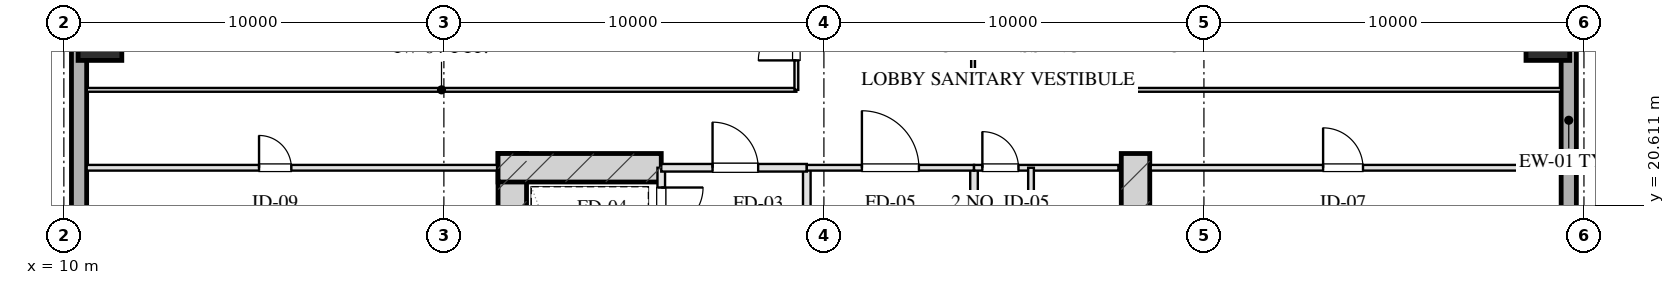
"""IFC4 building model, lengths in metres.
Left out: names, types, materials, properties, quantities, classifications, styles, units other than length and angle.
Written with IfcOpenShell. Run it as: python <this file> out.ifc"""

import sys

from ifc_helpers import new_model, si_unit, direction, frame, frame_2d, origin, origin_2d, place, context, subcontext, project, spatial, rectangle, hollow_rectangle, extrude, element, fill, save


model = new_model("IFC4")
c1 = context("Model", 3, precision=1e-05, world=origin(), true_north=direction((0.0, 1.0)))
c2 = subcontext(c1, "Body", "Model", "MODEL_VIEW")
j1 = project(units=[si_unit("LENGTHUNIT", "METRE"), si_unit("PLANEANGLEUNIT", "RADIAN")], contexts=[c1])
p1 = place(None, origin())
s1 = spatial("IfcSite", under=j1, at=p1, CompositionType="ELEMENT")
p2 = place(p1, origin())
s2 = spatial("IfcBuilding", under=s1, at=p2, CompositionType="ELEMENT")
p3 = place(p2, frame((0.0, 0.0, 50.6)))
s3 = spatial("IfcBuildingStorey", under=s2, at=p3, CompositionType="ELEMENT", Elevation=50.6)
for number, where, z_axis, x_axis in (
    (1, (21.8, 21.975, 0.0), (0.0, 0.0, 1.0), (0.0, -1.0, 0.0)),
    (2, (38.2, 21.975, 0.0), (0.0, 0.0, 1.0), (0.0, -1.0, 0.0)),
):
    element("IfcWall", number, at=place(p3, frame(where, z_axis=z_axis, x_axis=x_axis)), inside=s3, PredefinedType="SHEAR", context=c2, shape_type="SweptSolid", body=[
        extrude(rectangle(XDim=9.63, YDim=0.75, at=frame_2d((4.815, 0.0))), origin(), (0.0, 0.0, 1.0), 3.45),
    ])
p4 = place(p3, frame((21.425, 21.6, 0.0), z_axis=(0.0, 0.0, 1.0), x_axis=(1.0, 0.0, 0.0)))
e3 = element("IfcWall", 3, at=p4, inside=s3, PredefinedType="SHEAR", context=c2, shape_type="SweptSolid", body=[
    extrude(rectangle(XDim=4.295, YDim=0.75, at=frame_2d((2.147, 0.0))), origin(), (0.0, 0.0, 1.0), 3.45),
])
for number, where, z_axis, x_axis in (
    (4, (10.95, 25.0, 0.0), (0.0, 0.0, 1.0), (1.0, 0.0, 0.0)),
    (5, (49.05, 25.0, 0.0), (0.0, 0.0, 1.0), (1.0, 0.0, 0.0)),
):
    element("IfcColumn", number, at=place(p3, frame(where, z_axis=z_axis, x_axis=x_axis)), inside=s3, PredefinedType="COLUMN", context=c2, shape_type="SweptSolid", body=[
        extrude(hollow_rectangle(XDim=1.15, YDim=1.15, WallThickness=0.04, at=origin_2d()), origin(), (0.0, 0.0, 1.0), 3.451),
    ])
p5 = place(p3, frame((10.4, 7.2, 0.0), z_axis=(0.0, 0.0, 1.0), x_axis=(0.0, 1.0, 0.0)))
e6 = element("IfcWall", 6, at=p5, inside=s3, PredefinedType="SOLIDWALL", context=c2, shape_type="SweptSolid", body=[
    extrude(rectangle(XDim=53.6, YDim=0.4, at=frame_2d((26.8, 0.0))), origin(), (0.0, 0.0, 1.0), 2.61),
])
p6 = place(p5, frame((29.35, 0.0, 0.0)))
e7 = element("IfcOpeningElement", 7, at=p6, cuts=e6, PredefinedType="OPENING", context=c2, shape_type="SweptSolid", body=[
    extrude(rectangle(XDim=1.1, YDim=2.15, at=frame_2d((0.55, 1.075))), frame((0.0, 0.21, 0.0), z_axis=(0.0, -1.0, 0.0), x_axis=(1.0, 0.0, 0.0)), (0.0, 0.0, 1.0), 0.42),
])
p7 = place(p3, frame((49.6, 60.8, 0.0), z_axis=(0.0, 0.0, 1.0), x_axis=(0.0, -1.0, 0.0)))
e8 = element("IfcWall", 8, at=p7, inside=s3, PredefinedType="SOLIDWALL", context=c2, shape_type="SweptSolid", body=[
    extrude(rectangle(XDim=53.6, YDim=0.4, at=frame_2d((26.8, 0.0))), origin(), (0.0, 0.0, 1.0), 2.61),
])
p8 = place(p7, frame((31.95, 0.0, 0.75)))
e9 = element("IfcOpeningElement", 9, at=p8, cuts=e8, PredefinedType="OPENING", context=c2, shape_type="SweptSolid", body=[
    extrude(rectangle(XDim=2.5, YDim=1.46, at=frame_2d((1.25, 0.73))), frame((0.0, 0.21, 0.0), z_axis=(0.0, -1.0, 0.0), x_axis=(1.0, 0.0, 0.0)), (0.0, 0.0, 1.0), 0.42),
])
p9 = place(p7, frame((20.45, 0.0, 0.0)))
e10 = element("IfcOpeningElement", 10, at=p9, cuts=e8, PredefinedType="OPENING", context=c2, shape_type="SweptSolid", body=[
    extrude(rectangle(XDim=1.1, YDim=2.15, at=frame_2d((0.55, 1.075))), frame((0.0, 0.21, 0.0), z_axis=(0.0, -1.0, 0.0), x_axis=(1.0, 0.0, 0.0)), (0.0, 0.0, 1.0), 0.42),
])
p10 = place(p3, frame((25.72, 21.6, 0.0), z_axis=(0.0, 0.0, 1.0), x_axis=(0.0, -1.0, 0.0)))
e11 = element("IfcWall", 11, at=p10, inside=s3, PredefinedType="PARTITIONING", context=c2, shape_type="SweptSolid", body=[
    extrude(rectangle(XDim=1.9, YDim=0.2, at=frame_2d((0.95, 0.0))), origin(), (0.0, 0.0, 1.0), 3.175),
])
p11 = place(p10, frame((0.52, 0.0, 0.0)))
e12 = element("IfcOpeningElement", 12, at=p11, cuts=e11, PredefinedType="OPENING", context=c2, shape_type="SweptSolid", body=[
    extrude(rectangle(XDim=1.1, YDim=2.05, at=frame_2d((0.55, 1.025))), frame((0.0, 0.11, 0.0), z_axis=(0.0, -1.0, 0.0), x_axis=(1.0, 0.0, 0.0)), (0.0, 0.0, 1.0), 0.22),
])
p12 = place(p3, frame((29.55, 21.6, 0.0), z_axis=(0.0, 0.0, 1.0), x_axis=(0.0, -1.0, 0.0)))
e13 = element("IfcWall", 13, at=p12, inside=s3, PredefinedType="PARTITIONING", context=c2, shape_type="SweptSolid", body=[
    extrude(rectangle(XDim=8.43, YDim=0.2, at=frame_2d((4.215, 0.0))), origin(), (0.0, 0.0, 1.0), 3.175),
])
p13 = place(p3, frame((25.72, 21.6, 0.0), z_axis=(0.0, 0.0, 1.0), x_axis=(1.0, 0.0, 0.0)))
e14 = element("IfcWall", 14, at=p13, inside=s3, PredefinedType="PARTITIONING", context=c2, shape_type="SweptSolid", body=[
    extrude(rectangle(XDim=3.83, YDim=0.2, at=frame_2d((1.915, 0.0))), origin(), (0.0, 0.0, 1.0), 3.175),
])
p14 = place(p13, frame((1.35, 0.0, 0.0)))
e15 = element("IfcOpeningElement", 15, at=p14, cuts=e14, PredefinedType="OPENING", context=c2, shape_type="SweptSolid", body=[
    extrude(rectangle(XDim=1.2, YDim=2.05, at=frame_2d((0.6, 1.025))), frame((0.0, 0.11, 0.0), z_axis=(0.0, -1.0, 0.0), x_axis=(1.0, 0.0, 0.0)), (0.0, 0.0, 1.0), 0.22),
])
p15 = place(p3, frame((33.95, 21.6, 0.0), z_axis=(0.0, 0.0, 1.0), x_axis=(0.0, -1.0, 0.0)))
e16 = element("IfcWall", 16, at=p15, inside=s3, PredefinedType="PARTITIONING", context=c2, shape_type="SweptSolid", body=[
    extrude(rectangle(XDim=8.43, YDim=0.2, at=frame_2d((4.215, 0.0))), origin(), (0.0, 0.0, 1.0), 3.175),
])
p16 = place(p3, frame((29.55, 21.6, 0.0), z_axis=(0.0, 0.0, 1.0), x_axis=(1.0, 0.0, 0.0)))
e17 = element("IfcWall", 17, at=p16, inside=s3, PredefinedType="PARTITIONING", context=c2, shape_type="SweptSolid", body=[
    extrude(rectangle(XDim=4.4, YDim=0.15, at=frame_2d((2.2, 0.0))), origin(), (0.0, 0.0, 1.0), 3.175),
])
p17 = place(p16, frame((1.45, 0.0, 0.0)))
e18 = element("IfcOpeningElement", 18, at=p17, cuts=e17, PredefinedType="OPENING", context=c2, shape_type="SweptSolid", body=[
    extrude(rectangle(XDim=1.5, YDim=2.05, at=frame_2d((0.75, 1.025))), frame((0.0, 0.085, 0.0), z_axis=(0.0, -1.0, 0.0), x_axis=(1.0, 0.0, 0.0)), (0.0, 0.0, 1.0), 0.17),
])
p18 = place(p3, frame((33.95, 21.6, 0.0), z_axis=(0.0, 0.0, 1.0), x_axis=(1.0, 0.0, 0.0)))
e19 = element("IfcWall", 19, at=p18, inside=s3, PredefinedType="PARTITIONING", context=c2, shape_type="SweptSolid", body=[
    extrude(rectangle(XDim=3.8, YDim=0.15, at=frame_2d((1.9, 0.0))), origin(), (0.0, 0.0, 1.0), 3.175),
])
p19 = place(p18, frame((0.22, 0.0, 0.0)))
e20 = element("IfcOpeningElement", 20, at=p19, cuts=e19, PredefinedType="OPENING", context=c2, shape_type="SweptSolid", body=[
    extrude(rectangle(XDim=0.95, YDim=2.05, at=frame_2d((0.475, 1.025))), frame((0.0, 0.085, 0.0), z_axis=(0.0, -1.0, 0.0), x_axis=(1.0, 0.0, 0.0)), (0.0, 0.0, 1.0), 0.17),
])
p20 = place(p3, frame((35.45, 21.6, 0.0), z_axis=(0.0, 0.0, 1.0), x_axis=(0.0, -1.0, 0.0)))
e21 = element("IfcWall", 21, at=p20, inside=s3, PredefinedType="PARTITIONING", context=c2, shape_type="SweptSolid", body=[
    extrude(rectangle(XDim=8.43, YDim=0.15, at=frame_2d((4.215, 0.0))), origin(), (0.0, 0.0, 1.0), 2.815),
])
p21 = place(p20, frame((2.55, 0.0, 0.0)))
e22 = element("IfcOpeningElement", 22, at=p21, cuts=e21, PredefinedType="OPENING", context=c2, shape_type="SweptSolid", body=[
    extrude(rectangle(XDim=0.95, YDim=2.05, at=frame_2d((0.475, 1.025))), frame((0.0, 0.085, 0.0), z_axis=(0.0, -1.0, 0.0), x_axis=(1.0, 0.0, 0.0)), (0.0, 0.0, 1.0), 0.17),
])
p22 = place(p20, frame((4.7, 0.0, 0.0)))
e23 = element("IfcOpeningElement", 23, at=p22, cuts=e21, PredefinedType="OPENING", context=c2, shape_type="SweptSolid", body=[
    extrude(rectangle(XDim=0.9, YDim=2.05, at=frame_2d((0.45, 1.025))), frame((0.0, 0.085, 0.0), z_axis=(0.0, -1.0, 0.0), x_axis=(1.0, 0.0, 0.0)), (0.0, 0.0, 1.0), 0.17),
])
p23 = place(p20, frame((6.8, 0.0, 0.0)))
e24 = element("IfcOpeningElement", 24, at=p23, cuts=e21, PredefinedType="OPENING", context=c2, shape_type="SweptSolid", body=[
    extrude(rectangle(XDim=0.9, YDim=2.05, at=frame_2d((0.45, 1.025))), frame((0.0, 0.085, 0.0), z_axis=(0.0, -1.0, 0.0), x_axis=(1.0, 0.0, 0.0)), (0.0, 0.0, 1.0), 0.17),
])
p24 = place(p3, frame((10.6, 21.6, 0.0), z_axis=(0.0, 0.0, 1.0), x_axis=(1.0, 0.0, 0.0)))
e25 = element("IfcWall", 25, at=p24, inside=s3, PredefinedType="PARTITIONING", context=c2, shape_type="SweptSolid", body=[
    extrude(rectangle(XDim=10.8, YDim=0.15, at=frame_2d((5.4, 0.0))), origin(), (0.0, 0.0, 1.0), 3.175),
])
p25 = place(p24, frame((4.536, 0.0, 0.0)))
e26 = element("IfcOpeningElement", 26, at=p25, cuts=e25, PredefinedType="OPENING", context=c2, shape_type="SweptSolid", body=[
    extrude(rectangle(XDim=0.85, YDim=2.05, at=frame_2d((0.425, 1.025))), frame((0.0, 0.085, 0.0), z_axis=(0.0, -1.0, 0.0), x_axis=(1.0, 0.0, 0.0)), (0.0, 0.0, 1.0), 0.17),
])
p26 = place(p3, frame((38.6, 21.6, 0.0), z_axis=(0.0, 0.0, 1.0), x_axis=(1.0, 0.0, 0.0)))
e27 = element("IfcWall", 27, at=p26, inside=s3, PredefinedType="PARTITIONING", context=c2, shape_type="SweptSolid", body=[
    extrude(rectangle(XDim=10.8, YDim=0.15, at=frame_2d((5.4, 0.0))), origin(), (0.0, 0.0, 1.0), 3.175),
])
p27 = place(p26, frame((4.536, 0.0, 0.0)))
e28 = element("IfcOpeningElement", 28, at=p27, cuts=e27, PredefinedType="OPENING", context=c2, shape_type="SweptSolid", body=[
    extrude(rectangle(XDim=1.05, YDim=2.05, at=frame_2d((0.525, 1.025))), frame((0.0, 0.085, 0.0), z_axis=(0.0, -1.0, 0.0), x_axis=(1.0, 0.0, 0.0)), (0.0, 0.0, 1.0), 0.17),
])
p28 = place(p3, frame((10.6, 23.65, 0.0), z_axis=(0.0, 0.0, 1.0), x_axis=(1.0, 0.0, 0.0)))
e29 = element("IfcWall", 29, at=p28, inside=s3, PredefinedType="MOVABLE", context=c2, shape_type="SweptSolid", body=[
    extrude(rectangle(XDim=18.675, YDim=0.1, at=frame_2d((9.337, 0.0))), origin(), (0.0, 0.0, 1.0), 3.175),
])
p29 = place(p3, frame((33.925, 23.65, 0.0), z_axis=(0.0, 0.0, 1.0), x_axis=(1.0, 0.0, 0.0)))
e30 = element("IfcWall", 30, at=p29, inside=s3, PredefinedType="MOVABLE", context=c2, shape_type="SweptSolid", body=[
    extrude(rectangle(XDim=15.475, YDim=0.1, at=frame_2d((7.737, 0.0))), origin(), (0.0, 0.0, 1.0), 3.175),
])
p30 = place(p3, frame((29.275, 23.65, 0.0), z_axis=(0.0, 0.0, 1.0), x_axis=(0.0, 1.0, 0.0)))
e31 = element("IfcWall", 31, at=p30, inside=s3, PredefinedType="MOVABLE", context=c2, shape_type="SweptSolid", body=[
    extrude(rectangle(XDim=20.7, YDim=0.1, at=frame_2d((10.35, 0.0))), origin(), (0.0, 0.0, 1.0), 3.175),
])
p31 = place(p30, frame((0.775, 0.0, 0.0)))
e32 = element("IfcOpeningElement", 32, at=p31, cuts=e31, PredefinedType="OPENING", context=c2, shape_type="SweptSolid", body=[
    extrude(rectangle(XDim=1.0, YDim=2.05, at=frame_2d((0.5, 1.025))), frame((0.0, 0.06, 0.0), z_axis=(0.0, -1.0, 0.0), x_axis=(1.0, 0.0, 0.0)), (0.0, 0.0, 1.0), 0.12),
])
p32 = place(p30, frame((3.95, 0.0, 0.0)))
e33 = element("IfcOpeningElement", 33, at=p32, cuts=e31, PredefinedType="OPENING", context=c2, shape_type="SweptSolid", body=[
    extrude(rectangle(XDim=1.0, YDim=2.05, at=frame_2d((0.5, 1.025))), frame((0.0, 0.06, 0.0), z_axis=(0.0, -1.0, 0.0), x_axis=(1.0, 0.0, 0.0)), (0.0, 0.0, 1.0), 0.12),
])
p33 = place(p30, frame((8.364, 0.0, 0.0)))
e34 = element("IfcOpeningElement", 34, at=p33, cuts=e31, PredefinedType="OPENING", context=c2, shape_type="SweptSolid", body=[
    extrude(rectangle(XDim=1.0, YDim=2.05, at=frame_2d((0.5, 1.025))), frame((0.0, 0.06, 0.0), z_axis=(0.0, -1.0, 0.0), x_axis=(1.0, 0.0, 0.0)), (0.0, 0.0, 1.0), 0.12),
])
p34 = place(p30, frame((12.864, 0.0, 0.0)))
e35 = element("IfcOpeningElement", 35, at=p34, cuts=e31, PredefinedType="OPENING", context=c2, shape_type="SweptSolid", body=[
    extrude(rectangle(XDim=1.0, YDim=2.05, at=frame_2d((0.5, 1.025))), frame((0.0, 0.06, 0.0), z_axis=(0.0, -1.0, 0.0), x_axis=(1.0, 0.0, 0.0)), (0.0, 0.0, 1.0), 0.12),
])
p35 = place(p30, frame((16.383, 0.0, 0.0)))
e36 = element("IfcOpeningElement", 36, at=p35, cuts=e31, PredefinedType="OPENING", context=c2, shape_type="SweptSolid", body=[
    extrude(rectangle(XDim=1.05, YDim=2.05, at=frame_2d((0.525, 1.025))), frame((0.0, 0.06, 0.0), z_axis=(0.0, -1.0, 0.0), x_axis=(1.0, 0.0, 0.0)), (0.0, 0.0, 1.0), 0.12),
])
p36 = place(p30, frame((19.058, 0.0, 0.0)))
e37 = element("IfcOpeningElement", 37, at=p36, cuts=e31, PredefinedType="OPENING", context=c2, shape_type="SweptSolid", body=[
    extrude(rectangle(XDim=1.0, YDim=2.05, at=frame_2d((0.5, 1.025))), frame((0.0, 0.06, 0.0), z_axis=(0.0, -1.0, 0.0), x_axis=(1.0, 0.0, 0.0)), (0.0, 0.0, 1.0), 0.12),
])
p37 = place(p3, frame((33.925, 23.65, 0.0), z_axis=(0.0, 0.0, 1.0), x_axis=(0.0, 1.0, 0.0)))
e38 = element("IfcWall", 38, at=p37, inside=s3, PredefinedType="MOVABLE", context=c2, shape_type="SweptSolid", body=[
    extrude(rectangle(XDim=20.7, YDim=0.1, at=frame_2d((10.35, 0.0))), origin(), (0.0, 0.0, 1.0), 3.175),
])
p38 = place(p37, frame((2.675, 0.0, 0.0)))
e39 = element("IfcOpeningElement", 39, at=p38, cuts=e38, PredefinedType="OPENING", context=c2, shape_type="SweptSolid", body=[
    extrude(rectangle(XDim=1.0, YDim=2.05, at=frame_2d((0.5, 1.025))), frame((0.0, 0.06, 0.0), z_axis=(0.0, -1.0, 0.0), x_axis=(1.0, 0.0, 0.0)), (0.0, 0.0, 1.0), 0.12),
])
p39 = place(p37, frame((9.85, 0.0, 0.0)))
e40 = element("IfcOpeningElement", 40, at=p39, cuts=e38, PredefinedType="OPENING", context=c2, shape_type="SweptSolid", body=[
    extrude(rectangle(XDim=0.85, YDim=2.05, at=frame_2d((0.425, 1.025))), frame((0.0, 0.06, 0.0), z_axis=(0.0, -1.0, 0.0), x_axis=(1.0, 0.0, 0.0)), (0.0, 0.0, 1.0), 0.12),
])
p40 = place(p37, frame((17.025, 0.0, 0.0)))
e41 = element("IfcOpeningElement", 41, at=p40, cuts=e38, PredefinedType="OPENING", context=c2, shape_type="SweptSolid", body=[
    extrude(rectangle(XDim=1.0, YDim=2.05, at=frame_2d((0.5, 1.025))), frame((0.0, 0.06, 0.0), z_axis=(0.0, -1.0, 0.0), x_axis=(1.0, 0.0, 0.0)), (0.0, 0.0, 1.0), 0.12),
])
p41 = place(p11, origin())
e42 = element("IfcDoor", 42, at=p41, inside=s3, OperationType="SINGLE_SWING_LEFT", PredefinedType="DOOR", context=c2, shape_type="SweptSolid", body=[
    extrude(rectangle(XDim=1.1, YDim=2.05, at=frame_2d((0.55, 1.025))), frame((0.0, 0.025, 0.0), z_axis=(0.0, -1.0, 0.0), x_axis=(1.0, 0.0, 0.0)), (0.0, 0.0, 1.0), 0.05),
])
fill(e12, e42)
p42 = place(p14, origin())
e43 = element("IfcDoor", 43, at=p42, inside=s3, OperationType="SINGLE_SWING_LEFT", PredefinedType="DOOR", context=c2, shape_type="SweptSolid", body=[
    extrude(rectangle(XDim=1.2, YDim=2.05, at=frame_2d((0.6, 1.025))), frame((0.0, 0.025, 0.0), z_axis=(0.0, -1.0, 0.0), x_axis=(1.0, 0.0, 0.0)), (0.0, 0.0, 1.0), 0.05),
])
fill(e15, e43)
p43 = place(p17, origin())
e44 = element("IfcDoor", 44, at=p43, inside=s3, OperationType="SINGLE_SWING_LEFT", PredefinedType="DOOR", context=c2, shape_type="SweptSolid", body=[
    extrude(rectangle(XDim=1.5, YDim=2.05, at=frame_2d((0.75, 1.025))), frame((0.0, 0.025, 0.0), z_axis=(0.0, -1.0, 0.0), x_axis=(1.0, 0.0, 0.0)), (0.0, 0.0, 1.0), 0.05),
])
fill(e18, e44)
p44 = place(p19, origin())
e45 = element("IfcDoor", 45, at=p44, inside=s3, OperationType="SINGLE_SWING_LEFT", PredefinedType="DOOR", context=c2, shape_type="SweptSolid", body=[
    extrude(rectangle(XDim=0.95, YDim=2.05, at=frame_2d((0.475, 1.025))), frame((0.0, 0.025, 0.0), z_axis=(0.0, -1.0, 0.0), x_axis=(1.0, 0.0, 0.0)), (0.0, 0.0, 1.0), 0.05),
])
fill(e20, e45)
p45 = place(p25, origin())
e46 = element("IfcDoor", 46, at=p45, inside=s3, OperationType="SINGLE_SWING_LEFT", PredefinedType="DOOR", context=c2, shape_type="SweptSolid", body=[
    extrude(rectangle(XDim=0.85, YDim=2.05, at=frame_2d((0.425, 1.025))), frame((0.0, 0.025, 0.0), z_axis=(0.0, -1.0, 0.0), x_axis=(1.0, 0.0, 0.0)), (0.0, 0.0, 1.0), 0.05),
])
fill(e26, e46)
p46 = place(p27, origin())
e47 = element("IfcDoor", 47, at=p46, inside=s3, OperationType="SINGLE_SWING_LEFT", PredefinedType="DOOR", context=c2, shape_type="SweptSolid", body=[
    extrude(rectangle(XDim=1.05, YDim=2.05, at=frame_2d((0.525, 1.025))), frame((0.0, 0.025, 0.0), z_axis=(0.0, -1.0, 0.0), x_axis=(1.0, 0.0, 0.0)), (0.0, 0.0, 1.0), 0.05),
])
fill(e28, e47)
p47 = place(p31, origin())
e48 = element("IfcDoor", 48, at=p47, inside=s3, OperationType="SINGLE_SWING_LEFT", PredefinedType="DOOR", context=c2, shape_type="SweptSolid", body=[
    extrude(rectangle(XDim=1.0, YDim=2.05, at=frame_2d((0.5, 1.025))), frame((0.0, 0.025, 0.0), z_axis=(0.0, -1.0, 0.0), x_axis=(1.0, 0.0, 0.0)), (0.0, 0.0, 1.0), 0.05),
])
fill(e32, e48)
save(model, sys.argv[1])
